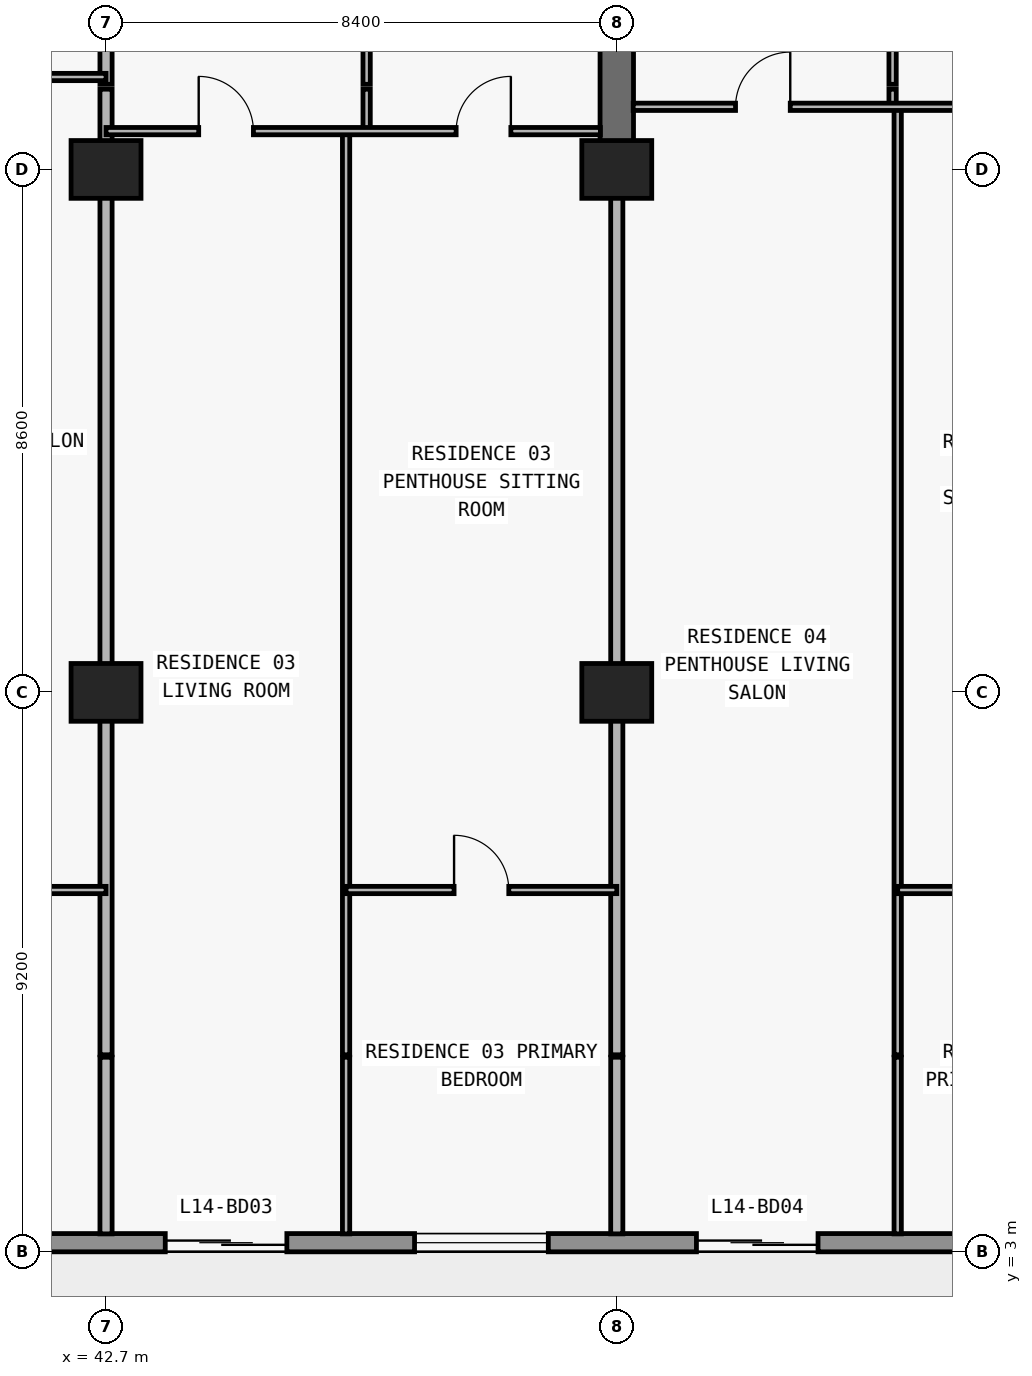
"""IFC4 building model, lengths in metres.
Left out: names, types, materials, properties, quantities, classifications, styles, units other than length and angle.
Written with IfcOpenShell. Run it as: python <this file> out.ifc"""

import sys

from ifc_helpers import new_model, si_unit, direction, frame, frame_2d, origin, origin_2d, place, context, subcontext, project, spatial, rectangle, extrude, element, fill, save


model = new_model("IFC4")
c1 = context("Model", 3, precision=1e-05, world=origin(), true_north=direction((0.0, 1.0)))
c2 = subcontext(c1, "Body", "Model", "MODEL_VIEW")
j1 = project(units=[si_unit("LENGTHUNIT", "METRE"), si_unit("PLANEANGLEUNIT", "RADIAN")], contexts=[c1])
p1 = place(None, origin())
s1 = spatial("IfcSite", under=j1, at=p1, CompositionType="ELEMENT")
p2 = place(p1, origin())
s2 = spatial("IfcBuilding", under=s1, at=p2, CompositionType="ELEMENT")
p3 = place(p2, frame((0.0, 0.0, 56.4)))
s3 = spatial("IfcBuildingStorey", under=s2, at=p3, CompositionType="ELEMENT", Elevation=56.4)
for number, where, z_axis, x_axis in (
    (1, (42.7, 12.2, 0.0), (0.0, 0.0, 1.0), (1.0, 0.0, 0.0)),
    (2, (51.1, 12.2, 0.0), (0.0, 0.0, 1.0), (1.0, 0.0, 0.0)),
    (3, (42.7, 20.8, 0.0), (0.0, 0.0, 1.0), (1.0, 0.0, 0.0)),
    (4, (51.1, 20.8, 0.0), (0.0, 0.0, 1.0), (1.0, 0.0, 0.0)),
):
    element("IfcColumn", number, at=place(p3, frame(where, z_axis=z_axis, x_axis=x_axis)), inside=s3, PredefinedType="COLUMN", context=c2, shape_type="SweptSolid", body=[
        extrude(rectangle(XDim=1.15, YDim=0.95, at=origin_2d()), origin(), (0.0, 0.0, 1.0), 3.05),
    ])
p4 = place(p3, frame((51.1, 20.8, 0.0), z_axis=(0.0, 0.0, 1.0), x_axis=(0.0, 1.0, 0.0)))
e5 = element("IfcWall", 5, at=p4, inside=s3, PredefinedType="SHEAR", context=c2, shape_type="SweptSolid", body=[
    extrude(rectangle(XDim=8.6, YDim=0.55, at=frame_2d((4.3, 0.0))), origin(), (0.0, 0.0, 1.0), 3.05),
])
p5 = place(p3, frame((72.7, 3.15, 0.0), z_axis=(0.0, 0.0, 1.0), x_axis=(-1.0, 0.0, 0.0)))
e6 = element("IfcWall", 6, at=p5, inside=s3, PredefinedType="STANDARD", context=c2, shape_type="SweptSolid", body=[
    extrude(rectangle(XDim=67.6, YDim=0.3, at=frame_2d((33.8, 0.0))), origin(), (0.0, 0.0, 1.0), 3.05),
])
p6 = place(p5, frame((59.89, 0.0, 0.0)))
e7 = element("IfcOpeningElement", 7, at=p6, cuts=e6, PredefinedType="OPENING", context=c2, shape_type="SweptSolid", body=[
    extrude(rectangle(XDim=2.0, YDim=2.3, at=frame_2d((1.0, 1.15))), frame((0.0, 0.16, 0.0), z_axis=(0.0, -1.0, 0.0), x_axis=(1.0, 0.0, 0.0)), (0.0, 0.0, 1.0), 0.32),
])
p7 = place(p5, frame((55.21, 0.0, 0.65)))
e8 = element("IfcOpeningElement", 8, at=p7, cuts=e6, PredefinedType="OPENING", context=c2, shape_type="SweptSolid", body=[
    extrude(rectangle(XDim=2.6, YDim=1.85, at=frame_2d((1.3, 0.925))), frame((0.0, 0.16, 0.0), z_axis=(0.0, -1.0, 0.0), x_axis=(1.0, 0.0, 0.0)), (0.0, 0.0, 1.0), 0.32),
])
p8 = place(p5, frame((49.1, 0.0, 0.85)))
e9 = element("IfcOpeningElement", 9, at=p8, cuts=e6, PredefinedType="OPENING", context=c2, shape_type="SweptSolid", body=[
    extrude(rectangle(XDim=2.2, YDim=1.55, at=frame_2d((1.1, 0.775))), frame((0.0, 0.16, 0.0), z_axis=(0.0, -1.0, 0.0), x_axis=(1.0, 0.0, 0.0)), (0.0, 0.0, 1.0), 0.32),
])
p9 = place(p5, frame((43.09, 0.0, 0.0)))
e10 = element("IfcOpeningElement", 10, at=p9, cuts=e6, PredefinedType="OPENING", context=c2, shape_type="SweptSolid", body=[
    extrude(rectangle(XDim=2.0, YDim=2.3, at=frame_2d((1.0, 1.15))), frame((0.0, 0.16, 0.0), z_axis=(0.0, -1.0, 0.0), x_axis=(1.0, 0.0, 0.0)), (0.0, 0.0, 1.0), 0.32),
])
p10 = place(p5, frame((38.41, 0.0, 0.65)))
e11 = element("IfcOpeningElement", 11, at=p10, cuts=e6, PredefinedType="OPENING", context=c2, shape_type="SweptSolid", body=[
    extrude(rectangle(XDim=2.6, YDim=1.85, at=frame_2d((1.3, 0.925))), frame((0.0, 0.16, 0.0), z_axis=(0.0, -1.0, 0.0), x_axis=(1.0, 0.0, 0.0)), (0.0, 0.0, 1.0), 0.32),
])
p11 = place(p5, frame((32.7, 0.0, 0.85)))
e12 = element("IfcOpeningElement", 12, at=p11, cuts=e6, PredefinedType="OPENING", context=c2, shape_type="SweptSolid", body=[
    extrude(rectangle(XDim=2.2, YDim=1.55, at=frame_2d((1.1, 0.775))), frame((0.0, 0.16, 0.0), z_axis=(0.0, -1.0, 0.0), x_axis=(1.0, 0.0, 0.0)), (0.0, 0.0, 1.0), 0.32),
])
p12 = place(p5, frame((27.026, 0.0, 0.0)))
e13 = element("IfcOpeningElement", 13, at=p12, cuts=e6, PredefinedType="OPENING", context=c2, shape_type="SweptSolid", body=[
    extrude(rectangle(XDim=2.0, YDim=2.3, at=frame_2d((1.0, 1.15))), frame((0.0, 0.16, 0.0), z_axis=(0.0, -1.0, 0.0), x_axis=(1.0, 0.0, 0.0)), (0.0, 0.0, 1.0), 0.32),
])
p13 = place(p5, frame((22.726, 0.0, 0.85)))
e14 = element("IfcOpeningElement", 14, at=p13, cuts=e6, PredefinedType="OPENING", context=c2, shape_type="SweptSolid", body=[
    extrude(rectangle(XDim=2.2, YDim=1.55, at=frame_2d((1.1, 0.775))), frame((0.0, 0.16, 0.0), z_axis=(0.0, -1.0, 0.0), x_axis=(1.0, 0.0, 0.0)), (0.0, 0.0, 1.0), 0.32),
])
p14 = place(p5, frame((18.29, 0.0, 0.0)))
e15 = element("IfcOpeningElement", 15, at=p14, cuts=e6, PredefinedType="OPENING", context=c2, shape_type="SweptSolid", body=[
    extrude(rectangle(XDim=2.0, YDim=2.3, at=frame_2d((1.0, 1.15))), frame((0.0, 0.16, 0.0), z_axis=(0.0, -1.0, 0.0), x_axis=(1.0, 0.0, 0.0)), (0.0, 0.0, 1.0), 0.32),
])
p15 = place(p5, frame((14.19, 0.0, 0.85)))
e16 = element("IfcOpeningElement", 16, at=p15, cuts=e6, PredefinedType="OPENING", context=c2, shape_type="SweptSolid", body=[
    extrude(rectangle(XDim=1.8, YDim=1.55, at=frame_2d((0.9, 0.775))), frame((0.0, 0.16, 0.0), z_axis=(0.0, -1.0, 0.0), x_axis=(1.0, 0.0, 0.0)), (0.0, 0.0, 1.0), 0.32),
])
p16 = place(p5, frame((10.226, 0.0, 0.0)))
e17 = element("IfcOpeningElement", 17, at=p16, cuts=e6, PredefinedType="OPENING", context=c2, shape_type="SweptSolid", body=[
    extrude(rectangle(XDim=2.0, YDim=2.3, at=frame_2d((1.0, 1.15))), frame((0.0, 0.16, 0.0), z_axis=(0.0, -1.0, 0.0), x_axis=(1.0, 0.0, 0.0)), (0.0, 0.0, 1.0), 0.32),
])
p17 = place(p5, frame((5.926, 0.0, 0.85)))
e18 = element("IfcOpeningElement", 18, at=p17, cuts=e6, PredefinedType="OPENING", context=c2, shape_type="SweptSolid", body=[
    extrude(rectangle(XDim=2.2, YDim=1.55, at=frame_2d((1.1, 0.775))), frame((0.0, 0.16, 0.0), z_axis=(0.0, -1.0, 0.0), x_axis=(1.0, 0.0, 0.0)), (0.0, 0.0, 1.0), 0.32),
])
p18 = place(p3, frame((42.7, 3.295, 0.0), z_axis=(0.0, 0.0, 1.0), x_axis=(0.0, 1.0, 0.0)))
e19 = element("IfcWall", 19, at=p18, inside=s3, PredefinedType="PARTITIONING", context=c2, shape_type="SweptSolid", body=[
    extrude(rectangle(XDim=2.905, YDim=0.2, at=frame_2d((1.453, 0.0))), origin(), (0.0, 0.0, 1.0), 3.05),
])
p19 = place(p3, frame((42.7, 6.24, 0.0), z_axis=(0.0, 0.0, 1.0), x_axis=(0.0, 1.0, 0.0)))
e20 = element("IfcWall", 20, at=p19, inside=s3, PredefinedType="PARTITIONING", context=c2, shape_type="SweptSolid", body=[
    extrude(rectangle(XDim=15.88, YDim=0.2, at=frame_2d((7.94, 0.0))), origin(), (0.0, 0.0, 1.0), 2.11),
])
p20 = place(p3, frame((42.7, 22.2, 0.0), z_axis=(0.0, 0.0, 1.0), x_axis=(0.0, 1.0, 0.0)))
e21 = element("IfcWall", 21, at=p20, inside=s3, PredefinedType="PARTITIONING", context=c2, shape_type="SweptSolid", body=[
    extrude(rectangle(XDim=4.38, YDim=0.2, at=frame_2d((2.19, 0.0))), origin(), (0.0, 0.0, 1.0), 2.11),
])
p21 = place(p3, frame((46.648, 3.295, 0.0), z_axis=(0.0, 0.0, 1.0), x_axis=(0.0, 1.0, 0.0)))
e22 = element("IfcWall", 22, at=p21, inside=s3, PredefinedType="PARTITIONING", context=c2, shape_type="SweptSolid", body=[
    extrude(rectangle(XDim=2.905, YDim=0.12, at=frame_2d((1.453, 0.0))), origin(), (0.0, 0.0, 1.0), 3.05),
])
p22 = place(p3, frame((46.648, 6.24, 0.0), z_axis=(0.0, 0.0, 1.0), x_axis=(0.0, 1.0, 0.0)))
e23 = element("IfcWall", 23, at=p22, inside=s3, PredefinedType="PARTITIONING", context=c2, shape_type="SweptSolid", body=[
    extrude(rectangle(XDim=15.19, YDim=0.12, at=frame_2d((7.595, 0.0))), origin(), (0.0, 0.0, 1.0), 3.05),
])
p23 = place(p3, frame((46.986, 21.43, 0.0), z_axis=(0.0, 0.0, 1.0), x_axis=(0.0, 1.0, 0.0)))
e24 = element("IfcWall", 24, at=p23, inside=s3, PredefinedType="PARTITIONING", context=c2, shape_type="SweptSolid", body=[
    extrude(rectangle(XDim=0.69, YDim=0.12, at=frame_2d((0.345, 0.0))), origin(), (0.0, 0.0, 1.0), 3.05),
])
p24 = place(p3, frame((46.986, 22.2, 0.0), z_axis=(0.0, 0.0, 1.0), x_axis=(0.0, 1.0, 0.0)))
e25 = element("IfcWall", 25, at=p24, inside=s3, PredefinedType="PARTITIONING", context=c2, shape_type="SweptSolid", body=[
    extrude(rectangle(XDim=4.38, YDim=0.12, at=frame_2d((2.19, 0.0))), origin(), (0.0, 0.0, 1.0), 3.05),
])
p25 = place(p24, frame((1.74, 0.0, 0.0)))
e26 = element("IfcOpeningElement", 26, at=p25, cuts=e25, PredefinedType="OPENING", context=c2, shape_type="SweptSolid", body=[
    extrude(rectangle(XDim=0.9, YDim=2.15, at=frame_2d((0.45, 1.075))), frame((0.0, 0.07, 0.0), z_axis=(0.0, -1.0, 0.0), x_axis=(1.0, 0.0, 0.0)), (0.0, 0.0, 1.0), 0.14),
])
p26 = place(p3, frame((51.1, 3.295, 0.0), z_axis=(0.0, 0.0, 1.0), x_axis=(0.0, 1.0, 0.0)))
e27 = element("IfcWall", 27, at=p26, inside=s3, PredefinedType="PARTITIONING", context=c2, shape_type="SweptSolid", body=[
    extrude(rectangle(XDim=2.905, YDim=0.2, at=frame_2d((1.453, 0.0))), origin(), (0.0, 0.0, 1.0), 3.05),
])
p27 = place(p3, frame((51.1, 6.24, 0.0), z_axis=(0.0, 0.0, 1.0), x_axis=(0.0, 1.0, 0.0)))
e28 = element("IfcWall", 28, at=p27, inside=s3, PredefinedType="PARTITIONING", context=c2, shape_type="SweptSolid", body=[
    extrude(rectangle(XDim=14.555, YDim=0.2, at=frame_2d((7.277, 0.0))), origin(), (0.0, 0.0, 1.0), 2.11),
])
p28 = place(p3, frame((55.636, 21.83, 0.0), z_axis=(0.0, 0.0, 1.0), x_axis=(0.0, 1.0, 0.0)))
e29 = element("IfcWall", 29, at=p28, inside=s3, PredefinedType="PARTITIONING", context=c2, shape_type="SweptSolid", body=[
    extrude(rectangle(XDim=0.29, YDim=0.12, at=frame_2d((0.145, 0.0))), origin(), (0.0, 0.0, 1.0), 3.05),
])
p29 = place(p3, frame((55.636, 22.2, 0.0), z_axis=(0.0, 0.0, 1.0), x_axis=(0.0, 1.0, 0.0)))
e30 = element("IfcWall", 30, at=p29, inside=s3, PredefinedType="PARTITIONING", context=c2, shape_type="SweptSolid", body=[
    extrude(rectangle(XDim=4.38, YDim=0.12, at=frame_2d((2.19, 0.0))), origin(), (0.0, 0.0, 1.0), 3.05),
])
p30 = place(p29, frame((1.74, 0.0, 0.0)))
e31 = element("IfcOpeningElement", 31, at=p30, cuts=e30, PredefinedType="OPENING", context=c2, shape_type="SweptSolid", body=[
    extrude(rectangle(XDim=0.9, YDim=2.15, at=frame_2d((0.45, 1.075))), frame((0.0, 0.07, 0.0), z_axis=(0.0, -1.0, 0.0), x_axis=(1.0, 0.0, 0.0)), (0.0, 0.0, 1.0), 0.14),
])
p31 = place(p3, frame((55.72, 3.295, 0.0), z_axis=(0.0, 0.0, 1.0), x_axis=(0.0, 1.0, 0.0)))
e32 = element("IfcWall", 32, at=p31, inside=s3, PredefinedType="PARTITIONING", context=c2, shape_type="SweptSolid", body=[
    extrude(rectangle(XDim=2.905, YDim=0.12, at=frame_2d((1.453, 0.0))), origin(), (0.0, 0.0, 1.0), 3.05),
])
p32 = place(p3, frame((55.72, 6.24, 0.0), z_axis=(0.0, 0.0, 1.0), x_axis=(0.0, 1.0, 0.0)))
e33 = element("IfcWall", 33, at=p32, inside=s3, PredefinedType="PARTITIONING", context=c2, shape_type="SweptSolid", body=[
    extrude(rectangle(XDim=15.585, YDim=0.12, at=frame_2d((7.792, 0.0))), origin(), (0.0, 0.0, 1.0), 3.05),
])
p33 = place(p3, frame((35.1, 8.95, 0.0), z_axis=(0.0, 0.0, 1.0), x_axis=(1.0, 0.0, 0.0)))
e34 = element("IfcWall", 34, at=p33, inside=s3, PredefinedType="PARTITIONING", context=c2, shape_type="SweptSolid", body=[
    extrude(rectangle(XDim=7.6, YDim=0.12, at=frame_2d((3.8, 0.0))), origin(), (0.0, 0.0, 1.0), 3.05),
])
p34 = place(p33, frame((3.35, 0.0, 0.0)))
e35 = element("IfcOpeningElement", 35, at=p34, cuts=e34, PredefinedType="OPENING", context=c2, shape_type="SweptSolid", body=[
    extrude(rectangle(XDim=0.9, YDim=2.15, at=frame_2d((0.45, 1.075))), frame((0.0, 0.07, 0.0), z_axis=(0.0, -1.0, 0.0), x_axis=(1.0, 0.0, 0.0)), (0.0, 0.0, 1.0), 0.14),
])
p35 = place(p3, frame((46.648, 8.95, 0.0), z_axis=(0.0, 0.0, 1.0), x_axis=(1.0, 0.0, 0.0)))
e36 = element("IfcWall", 36, at=p35, inside=s3, PredefinedType="PARTITIONING", context=c2, shape_type="SweptSolid", body=[
    extrude(rectangle(XDim=4.452, YDim=0.12, at=frame_2d((2.226, 0.0))), origin(), (0.0, 0.0, 1.0), 3.05),
])
p36 = place(p35, frame((1.776, 0.0, 0.0)))
e37 = element("IfcOpeningElement", 37, at=p36, cuts=e36, PredefinedType="OPENING", context=c2, shape_type="SweptSolid", body=[
    extrude(rectangle(XDim=0.9, YDim=2.15, at=frame_2d((0.45, 1.075))), frame((0.0, 0.07, 0.0), z_axis=(0.0, -1.0, 0.0), x_axis=(1.0, 0.0, 0.0)), (0.0, 0.0, 1.0), 0.14),
])
p37 = place(p3, frame((55.72, 8.95, 0.0), z_axis=(0.0, 0.0, 1.0), x_axis=(1.0, 0.0, 0.0)))
e38 = element("IfcWall", 38, at=p37, inside=s3, PredefinedType="PARTITIONING", context=c2, shape_type="SweptSolid", body=[
    extrude(rectangle(XDim=3.78, YDim=0.12, at=frame_2d((1.89, 0.0))), origin(), (0.0, 0.0, 1.0), 3.05),
])
p38 = place(p37, frame((1.44, 0.0, 0.0)))
e39 = element("IfcOpeningElement", 39, at=p38, cuts=e38, PredefinedType="OPENING", context=c2, shape_type="SweptSolid", body=[
    extrude(rectangle(XDim=0.9, YDim=2.15, at=frame_2d((0.45, 1.075))), frame((0.0, 0.07, 0.0), z_axis=(0.0, -1.0, 0.0), x_axis=(1.0, 0.0, 0.0)), (0.0, 0.0, 1.0), 0.14),
])
p39 = place(p3, frame((42.7, 21.43, 0.0), z_axis=(0.0, 0.0, 1.0), x_axis=(1.0, 0.0, 0.0)))
e40 = element("IfcWall", 40, at=p39, inside=s3, PredefinedType="PARTITIONING", context=c2, shape_type="SweptSolid", body=[
    extrude(rectangle(XDim=8.13, YDim=0.12, at=frame_2d((4.065, 0.0))), origin(), (0.0, 0.0, 1.0), 3.05),
])
p40 = place(p39, frame((1.524, 0.0, 0.0)))
e41 = element("IfcOpeningElement", 41, at=p40, cuts=e40, PredefinedType="OPENING", context=c2, shape_type="SweptSolid", body=[
    extrude(rectangle(XDim=0.9, YDim=2.15, at=frame_2d((0.45, 1.075))), frame((0.0, 0.07, 0.0), z_axis=(0.0, -1.0, 0.0), x_axis=(1.0, 0.0, 0.0)), (0.0, 0.0, 1.0), 0.14),
])
p41 = place(p39, frame((5.758, 0.0, 0.0)))
e42 = element("IfcOpeningElement", 42, at=p41, cuts=e40, PredefinedType="OPENING", context=c2, shape_type="SweptSolid", body=[
    extrude(rectangle(XDim=0.9, YDim=2.15, at=frame_2d((0.45, 1.075))), frame((0.0, 0.07, 0.0), z_axis=(0.0, -1.0, 0.0), x_axis=(1.0, 0.0, 0.0)), (0.0, 0.0, 1.0), 0.14),
])
p42 = place(p3, frame((51.37, 21.83, 0.0), z_axis=(0.0, 0.0, 1.0), x_axis=(1.0, 0.0, 0.0)))
e43 = element("IfcWall", 43, at=p42, inside=s3, PredefinedType="PARTITIONING", context=c2, shape_type="SweptSolid", body=[
    extrude(rectangle(XDim=8.13, YDim=0.12, at=frame_2d((4.065, 0.0))), origin(), (0.0, 0.0, 1.0), 3.05),
])
p43 = place(p42, frame((1.683, 0.0, 0.0)))
e44 = element("IfcOpeningElement", 44, at=p43, cuts=e43, PredefinedType="OPENING", context=c2, shape_type="SweptSolid", body=[
    extrude(rectangle(XDim=0.9, YDim=2.15, at=frame_2d((0.45, 1.075))), frame((0.0, 0.07, 0.0), z_axis=(0.0, -1.0, 0.0), x_axis=(1.0, 0.0, 0.0)), (0.0, 0.0, 1.0), 0.14),
])
p44 = place(p42, frame((5.79, 0.0, 0.0)))
e45 = element("IfcOpeningElement", 45, at=p44, cuts=e43, PredefinedType="OPENING", context=c2, shape_type="SweptSolid", body=[
    extrude(rectangle(XDim=0.9, YDim=2.15, at=frame_2d((0.45, 1.075))), frame((0.0, 0.07, 0.0), z_axis=(0.0, -1.0, 0.0), x_axis=(1.0, 0.0, 0.0)), (0.0, 0.0, 1.0), 0.14),
])
p45 = place(p3, frame((35.105, 22.32, 0.0), z_axis=(0.0, 0.0, 1.0), x_axis=(1.0, 0.0, 0.0)))
e46 = element("IfcWall", 46, at=p45, inside=s3, PredefinedType="PARTITIONING", context=c2, shape_type="SweptSolid", body=[
    extrude(rectangle(XDim=7.595, YDim=0.12, at=frame_2d((3.797, 0.0))), origin(), (0.0, 0.0, 1.0), 3.05),
])
p46 = place(p45, frame((3.347, 0.0, 0.0)))
e47 = element("IfcOpeningElement", 47, at=p46, cuts=e46, PredefinedType="OPENING", context=c2, shape_type="SweptSolid", body=[
    extrude(rectangle(XDim=0.9, YDim=2.15, at=frame_2d((0.45, 1.075))), frame((0.0, 0.07, 0.0), z_axis=(0.0, -1.0, 0.0), x_axis=(1.0, 0.0, 0.0)), (0.0, 0.0, 1.0), 0.14),
])
p47 = place(p12, origin())
e48 = element("IfcDoor", 48, at=p47, inside=s3, OperationType="DOUBLE_DOOR_SLIDING", PredefinedType="DOOR", context=c2, shape_type="SweptSolid", body=[
    extrude(rectangle(XDim=2.0, YDim=2.3, at=frame_2d((1.0, 1.15))), frame((0.0, 0.025, 0.0), z_axis=(0.0, -1.0, 0.0), x_axis=(1.0, 0.0, 0.0)), (0.0, 0.0, 1.0), 0.05),
])
fill(e13, e48)
p48 = place(p13, origin())
e49 = element("IfcWindow", 49, at=p48, inside=s3, PartitioningType="SINGLE_PANEL", PredefinedType="WINDOW", context=c2, shape_type="SweptSolid", body=[
    extrude(rectangle(XDim=2.2, YDim=1.55, at=frame_2d((1.1, 0.775))), frame((0.0, 0.03, 0.0), z_axis=(0.0, -1.0, 0.0), x_axis=(1.0, 0.0, 0.0)), (0.0, 0.0, 1.0), 0.06),
])
fill(e14, e49)
p49 = place(p14, origin())
e50 = element("IfcDoor", 50, at=p49, inside=s3, OperationType="DOUBLE_DOOR_SLIDING", PredefinedType="DOOR", context=c2, shape_type="SweptSolid", body=[
    extrude(rectangle(XDim=2.0, YDim=2.3, at=frame_2d((1.0, 1.15))), frame((0.0, 0.025, 0.0), z_axis=(0.0, -1.0, 0.0), x_axis=(1.0, 0.0, 0.0)), (0.0, 0.0, 1.0), 0.05),
])
fill(e15, e50)
p50 = place(p40, origin())
e51 = element("IfcDoor", 51, at=p50, inside=s3, OperationType="SINGLE_SWING_LEFT", PredefinedType="DOOR", context=c2, shape_type="SweptSolid", body=[
    extrude(rectangle(XDim=0.9, YDim=2.15, at=frame_2d((0.45, 1.075))), frame((0.0, 0.025, 0.0), z_axis=(0.0, -1.0, 0.0), x_axis=(1.0, 0.0, 0.0)), (0.0, 0.0, 1.0), 0.05),
])
fill(e41, e51)
p51 = place(p41, origin())
e52 = element("IfcDoor", 52, at=p51, inside=s3, OperationType="SINGLE_SWING_RIGHT", PredefinedType="DOOR", context=c2, shape_type="SweptSolid", body=[
    extrude(rectangle(XDim=0.9, YDim=2.15, at=frame_2d((0.45, 1.075))), frame((0.0, 0.025, 0.0), z_axis=(0.0, -1.0, 0.0), x_axis=(1.0, 0.0, 0.0)), (0.0, 0.0, 1.0), 0.05),
])
fill(e42, e52)
p52 = place(p36, origin())
e53 = element("IfcDoor", 53, at=p52, inside=s3, OperationType="SINGLE_SWING_LEFT", PredefinedType="DOOR", context=c2, shape_type="SweptSolid", body=[
    extrude(rectangle(XDim=0.9, YDim=2.15, at=frame_2d((0.45, 1.075))), frame((0.0, 0.025, 0.0), z_axis=(0.0, -1.0, 0.0), x_axis=(1.0, 0.0, 0.0)), (0.0, 0.0, 1.0), 0.05),
])
fill(e37, e53)
p53 = place(p43, origin())
e54 = element("IfcDoor", 54, at=p53, inside=s3, OperationType="SINGLE_SWING_RIGHT", PredefinedType="DOOR", context=c2, shape_type="SweptSolid", body=[
    extrude(rectangle(XDim=0.9, YDim=2.15, at=frame_2d((0.45, 1.075))), frame((0.0, 0.025, 0.0), z_axis=(0.0, -1.0, 0.0), x_axis=(1.0, 0.0, 0.0)), (0.0, 0.0, 1.0), 0.05),
])
fill(e44, e54)
save(model, sys.argv[1])
